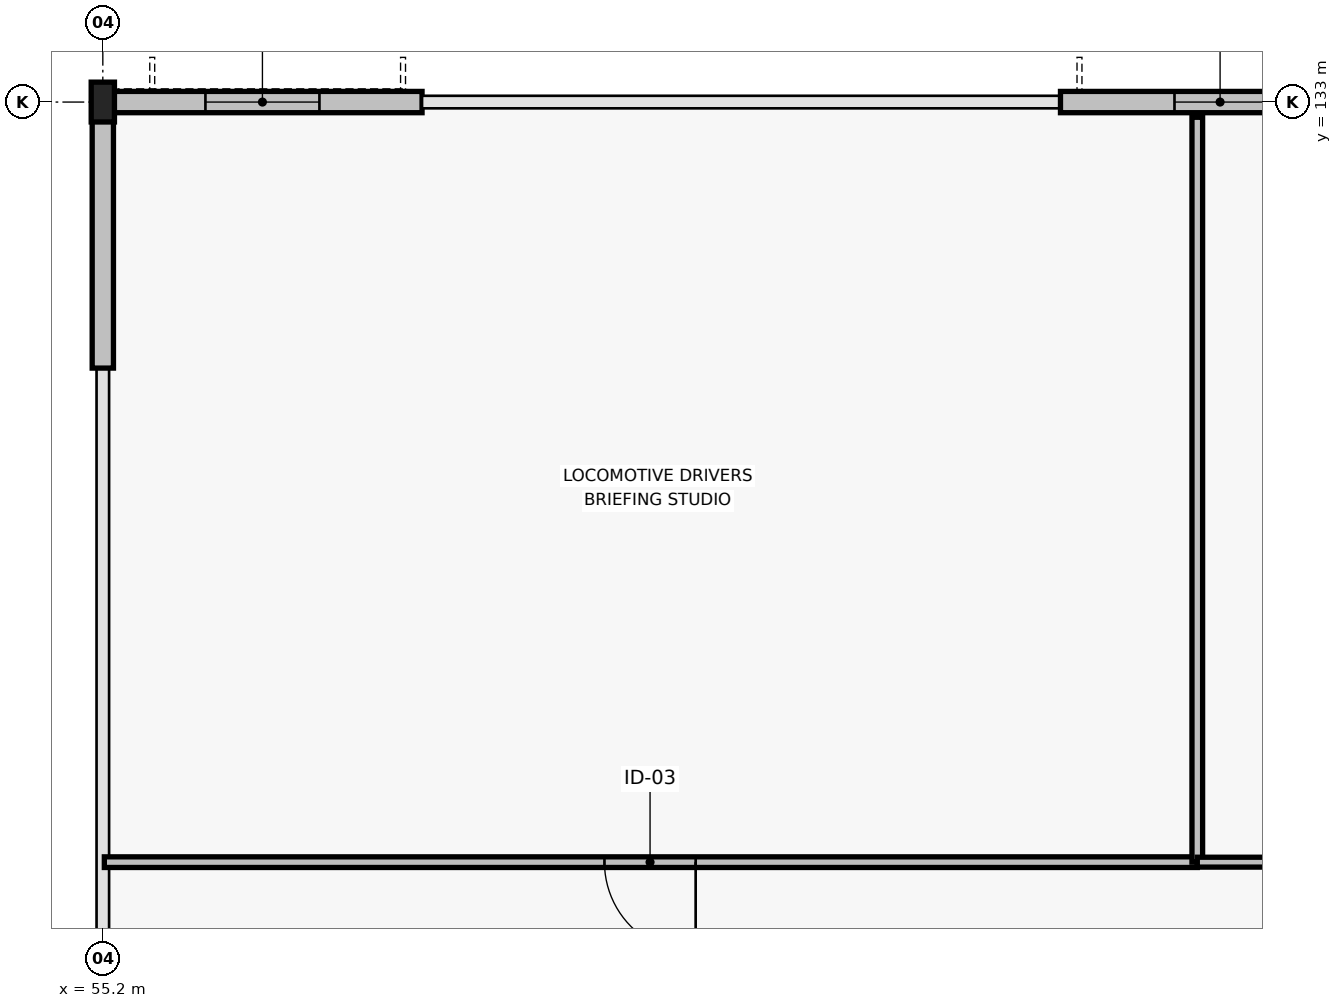
"""IFC4 building model, lengths in metres.
Left out: names, types, materials, properties, quantities, classifications, styles, units other than length and angle.
Written with IfcOpenShell. Run it as: python <this file> out.ifc"""

import sys

from ifc_helpers import new_model, si_unit, direction, frame, frame_2d, origin, origin_2d, place, context, subcontext, project, spatial, rectangle, i_section, extrude, element, fill, save


model = new_model("IFC4")
c1 = context("Model", 3, precision=1e-05, world=origin(), true_north=direction((0.0, 1.0)))
c2 = subcontext(c1, "Body", "Model", "MODEL_VIEW")
j1 = project(units=[si_unit("LENGTHUNIT", "METRE"), si_unit("PLANEANGLEUNIT", "RADIAN")], contexts=[c1])
p1 = place(None, origin())
s1 = spatial("IfcSite", under=j1, at=p1, CompositionType="ELEMENT")
p2 = place(p1, origin())
s2 = spatial("IfcBuilding", under=s1, at=p2, CompositionType="ELEMENT")
p3 = place(p2, frame((0.0, 0.0, 5.4)))
s3 = spatial("IfcBuildingStorey", under=s2, at=p3, CompositionType="ELEMENT", Elevation=5.4)
p4 = place(p3, frame((55.2, 133.0, 0.0), z_axis=(0.0, 0.0, 1.0), x_axis=(1.0, 0.0, 0.0)))
e1 = element("IfcColumn", 1, at=p4, inside=s3, PredefinedType="COLUMN", context=c2, shape_type="SweptSolid", body=[
    extrude(i_section(OverallWidth=0.306, OverallDepth=0.524, WebThickness=0.021, FlangeThickness=0.04, FilletRadius=0.027, at=origin_2d()), origin(), (0.0, 0.0, 1.0), 5.4),
])
p5 = place(p3, frame((55.2, 133.0, 0.0), z_axis=(0.0, 0.0, 1.0), x_axis=(1.0, 0.0, 0.0)))
e2 = element("IfcWall", 2, at=p5, inside=s3, PredefinedType="STANDARD", context=c2, shape_type="SweptSolid", body=[
    extrude(rectangle(XDim=4.2, YDim=0.28, at=frame_2d((2.1, 0.0))), origin(), (0.0, 0.0, 1.0), 4.765),
])
p6 = place(p5, frame((1.35, 0.0, 0.8)))
e3 = element("IfcOpeningElement", 3, at=p6, cuts=e2, PredefinedType="OPENING", context=c2, shape_type="SweptSolid", body=[
    extrude(rectangle(XDim=1.5, YDim=1.9, at=frame_2d((0.75, 0.95))), frame((0.0, 0.15, 0.0), z_axis=(0.0, -1.0, 0.0), x_axis=(1.0, 0.0, 0.0)), (0.0, 0.0, 1.0), 0.3),
])
p7 = place(p3, frame((67.8, 133.0, 0.0), z_axis=(0.0, 0.0, 1.0), x_axis=(1.0, 0.0, 0.0)))
e4 = element("IfcWall", 4, at=p7, inside=s3, PredefinedType="STANDARD", context=c2, shape_type="SweptSolid", body=[
    extrude(rectangle(XDim=4.2, YDim=0.28, at=frame_2d((2.1, 0.0))), origin(), (0.0, 0.0, 1.0), 4.765),
])
p8 = place(p7, frame((1.5, 0.0, 0.8)))
e5 = element("IfcOpeningElement", 5, at=p8, cuts=e4, PredefinedType="OPENING", context=c2, shape_type="SweptSolid", body=[
    extrude(rectangle(XDim=1.2, YDim=1.9, at=frame_2d((0.6, 0.95))), frame((0.0, 0.15, 0.0), z_axis=(0.0, -1.0, 0.0), x_axis=(1.0, 0.0, 0.0)), (0.0, 0.0, 1.0), 0.3),
])
p9 = place(p3, frame((55.2, 129.5, 0.0), z_axis=(0.0, 0.0, 1.0), x_axis=(0.0, 1.0, 0.0)))
e6 = element("IfcWall", 6, at=p9, inside=s3, PredefinedType="STANDARD", context=c2, shape_type="SweptSolid", body=[
    extrude(rectangle(XDim=3.36, YDim=0.28, at=frame_2d((1.68, 0.0))), origin(), (0.0, 0.0, 1.0), 4.765),
])
p10 = place(p3, frame((55.22, 123.0, 0.0), z_axis=(0.0, 0.0, 1.0), x_axis=(1.0, 0.0, 0.0)))
e7 = element("IfcWall", 7, at=p10, inside=s3, PredefinedType="PARTITIONING", context=c2, shape_type="SweptSolid", body=[
    extrude(rectangle(XDim=14.38, YDim=0.14, at=frame_2d((7.19, 0.0))), origin(), (0.0, 0.0, 1.0), 5.16),
])
p11 = place(p10, frame((6.58, 0.0, 0.0)))
e8 = element("IfcOpeningElement", 8, at=p11, cuts=e7, PredefinedType="OPENING", context=c2, shape_type="SweptSolid", body=[
    extrude(rectangle(XDim=1.2, YDim=2.2, at=frame_2d((0.6, 1.1))), frame((0.0, 0.08, 0.0), z_axis=(0.0, -1.0, 0.0), x_axis=(1.0, 0.0, 0.0)), (0.0, 0.0, 1.0), 0.16),
])
p12 = place(p3, frame((69.6, 123.0, 0.0), z_axis=(0.0, 0.0, 1.0), x_axis=(0.0, 1.0, 0.0)))
e9 = element("IfcWall", 9, at=p12, inside=s3, PredefinedType="PARTITIONING", context=c2, shape_type="SweptSolid", body=[
    extrude(rectangle(XDim=9.8, YDim=0.14, at=frame_2d((4.9, 0.0))), origin(), (0.0, 0.0, 1.0), 5.16),
])
p13 = place(p3, frame((69.6, 123.0, 0.0), z_axis=(0.0, 0.0, 1.0), x_axis=(1.0, 0.0, 0.0)))
e10 = element("IfcWall", 10, at=p13, inside=s3, PredefinedType="PARTITIONING", context=c2, shape_type="SweptSolid", body=[
    extrude(rectangle(XDim=16.0, YDim=0.13, at=frame_2d((8.0, 0.0))), origin(), (0.0, 0.0, 1.0), 5.16),
])
p14 = place(p13, frame((8.55, 0.0, 0.0), z_axis=(0.0, 0.0, 1.0), x_axis=(-1.0, 0.0, 0.0)))
e11 = element("IfcOpeningElement", 11, at=p14, cuts=e10, PredefinedType="OPENING", context=c2, shape_type="SweptSolid", body=[
    extrude(rectangle(XDim=1.1, YDim=2.15, at=frame_2d((0.55, 1.075))), frame((0.0, 0.075, 0.0), z_axis=(0.0, -1.0, 0.0), x_axis=(1.0, 0.0, 0.0)), (0.0, 0.0, 1.0), 0.15),
])
p15 = place(p6, origin())
e12 = element("IfcWindow", 12, at=p15, inside=s3, PartitioningType="SINGLE_PANEL", PredefinedType="WINDOW", context=c2, shape_type="SweptSolid", body=[
    extrude(rectangle(XDim=1.5, YDim=1.9, at=frame_2d((0.75, 0.95))), frame((0.0, 0.03, 0.0), z_axis=(0.0, -1.0, 0.0), x_axis=(1.0, 0.0, 0.0)), (0.0, 0.0, 1.0), 0.06),
])
fill(e3, e12)
p16 = place(p8, origin())
e13 = element("IfcWindow", 13, at=p16, inside=s3, PartitioningType="SINGLE_PANEL", PredefinedType="WINDOW", context=c2, shape_type="SweptSolid", body=[
    extrude(rectangle(XDim=1.2, YDim=1.9, at=frame_2d((0.6, 0.95))), frame((0.0, 0.03, 0.0), z_axis=(0.0, -1.0, 0.0), x_axis=(1.0, 0.0, 0.0)), (0.0, 0.0, 1.0), 0.06),
])
fill(e5, e13)
p17 = place(p11, origin())
e14 = element("IfcDoor", 14, at=p17, inside=s3, OperationType="SINGLE_SWING_RIGHT", PredefinedType="DOOR", context=c2, shape_type="SweptSolid", body=[
    extrude(rectangle(XDim=1.2, YDim=2.2, at=frame_2d((0.6, 1.1))), frame((0.0, 0.025, 0.0), z_axis=(0.0, -1.0, 0.0), x_axis=(1.0, 0.0, 0.0)), (0.0, 0.0, 1.0), 0.05),
])
fill(e8, e14)
save(model, sys.argv[1])
